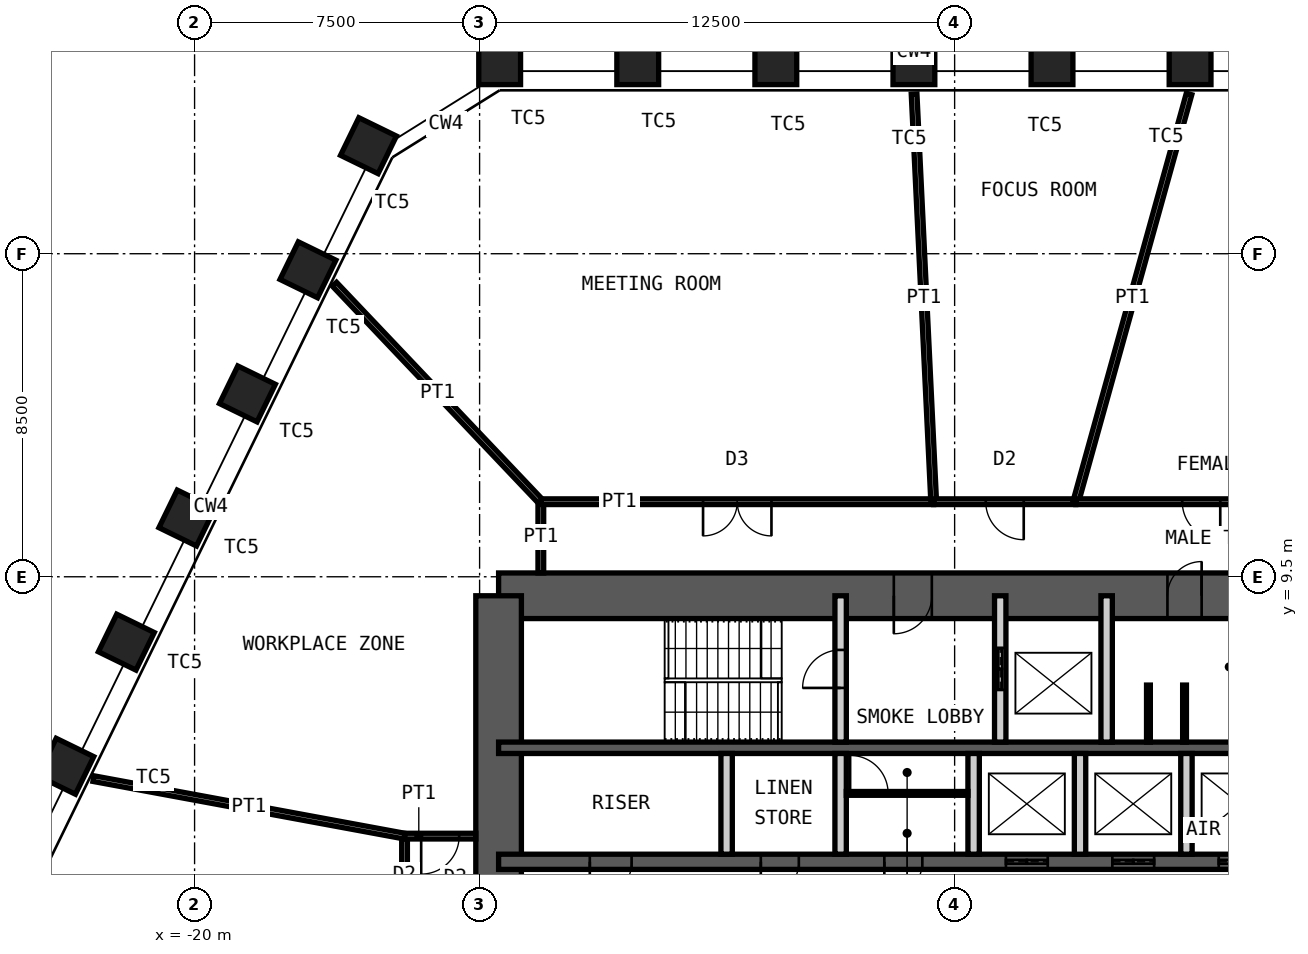
"""IFC4 building model, lengths in metres.
Left out: names, types, materials, properties, quantities, classifications, styles, units other than length and angle.
Written with IfcOpenShell. Run it as: python <this file> out.ifc"""

import sys

from ifc_helpers import new_model, si_unit, direction, frame, frame_2d, origin, origin_2d, place, context, subcontext, project, spatial, rectangle, hollow_rectangle, extrude, element, fill, save


model = new_model("IFC4")
c1 = context("Model", 3, precision=1e-05, world=origin(), true_north=direction((0.0, 1.0)))
c2 = subcontext(c1, "Body", "Model", "MODEL_VIEW")
j1 = project(units=[si_unit("LENGTHUNIT", "METRE"), si_unit("PLANEANGLEUNIT", "RADIAN")], contexts=[c1])
p1 = place(None, origin())
s1 = spatial("IfcSite", under=j1, at=p1, CompositionType="ELEMENT")
p2 = place(p1, origin())
s2 = spatial("IfcBuilding", under=s1, at=p2, CompositionType="ELEMENT")
p3 = place(p2, frame((0.0, 0.0, 209.8)))
s3 = spatial("IfcBuildingStorey", under=s2, at=p3, CompositionType="ELEMENT", Elevation=209.8)
for number, where, z_axis, x_axis in (
    (1, (-11.972, 23.0, 0.0), (0.0, 0.0, 1.0), (-1.0, 0.0, 0.0)),
    (2, (-8.338, 23.0, 0.0), (0.0, 0.0, 1.0), (-1.0, 0.0, 0.0)),
    (3, (-4.705, 23.0, 0.0), (0.0, 0.0, 1.0), (-1.0, 0.0, 0.0)),
    (4, (-1.071, 23.0, 0.0), (0.0, 0.0, 1.0), (-1.0, 0.0, 0.0)),
    (5, (2.562, 23.0, 0.0), (0.0, 0.0, 1.0), (-1.0, 0.0, 0.0)),
    (6, (6.196, 23.0, 0.0), (0.0, 0.0, 1.0), (-1.0, 0.0, 0.0)),
    (7, (-23.388, 4.514, 0.0), (0.0, 0.0, 1.0), (-0.438, -0.899, 0.0)),
    (8, (-21.795, 7.78, 0.0), (0.0, 0.0, 1.0), (-0.438, -0.899, 0.0)),
    (9, (-20.203, 11.045, 0.0), (0.0, 0.0, 1.0), (-0.438, -0.899, 0.0)),
    (10, (-18.61, 14.311, 0.0), (0.0, 0.0, 1.0), (-0.438, -0.899, 0.0)),
    (11, (-17.017, 17.577, 0.0), (0.0, 0.0, 1.0), (-0.438, -0.899, 0.0)),
    (12, (-15.424, 20.843, 0.0), (0.0, 0.0, 1.0), (-0.438, -0.899, 0.0)),
):
    element("IfcColumn", number, at=place(p3, frame(where, z_axis=z_axis, x_axis=x_axis)), inside=s3, PredefinedType="COLUMN", context=c2, shape_type="SweptSolid", body=[
        extrude(hollow_rectangle(XDim=1.1, YDim=1.1, WallThickness=0.07, at=origin_2d()), origin(), (0.0, 0.0, 1.0), 4.2),
    ])
p4 = place(p3, frame((-12.0, 9.0, 0.0), z_axis=(0.0, 0.0, 1.0), x_axis=(1.0, 0.0, 0.0)))
e13 = element("IfcWall", 13, at=p4, inside=s3, PredefinedType="SHEAR", context=c2, shape_type="SweptSolid", body=[
    extrude(rectangle(XDim=24.0, YDim=1.2, at=frame_2d((12.0, 0.0))), origin(), (0.0, 0.0, 1.0), 4.2),
])
p5 = place(p4, frame((10.4, 0.0, 0.0)))
e14 = element("IfcOpeningElement", 14, at=p5, cuts=e13, PredefinedType="OPENING", context=c2, shape_type="SweptSolid", body=[
    extrude(rectangle(XDim=1.0, YDim=2.1, at=frame_2d((0.5, 1.05))), frame((0.0, 0.61, 0.0), z_axis=(0.0, -1.0, 0.0), x_axis=(1.0, 0.0, 0.0)), (0.0, 0.0, 1.0), 1.22),
])
p6 = place(p4, frame((17.6, 0.0, 0.0)))
e15 = element("IfcOpeningElement", 15, at=p6, cuts=e13, PredefinedType="OPENING", context=c2, shape_type="SweptSolid", body=[
    extrude(rectangle(XDim=0.9, YDim=2.1, at=frame_2d((0.45, 1.05))), frame((0.0, 0.61, 0.0), z_axis=(0.0, -1.0, 0.0), x_axis=(1.0, 0.0, 0.0)), (0.0, 0.0, 1.0), 1.22),
])
p7 = place(p4, frame((21.9, 0.0, 0.0)))
e16 = element("IfcOpeningElement", 16, at=p7, cuts=e13, PredefinedType="OPENING", context=c2, shape_type="SweptSolid", body=[
    extrude(rectangle(XDim=0.9, YDim=2.1, at=frame_2d((0.45, 1.05))), frame((0.0, 0.61, 0.0), z_axis=(0.0, -1.0, 0.0), x_axis=(1.0, 0.0, 0.0)), (0.0, 0.0, 1.0), 1.22),
])
p8 = place(p3, frame((-12.0, -9.0, 0.0), z_axis=(0.0, 0.0, 1.0), x_axis=(0.0, 1.0, 0.0)))
e17 = element("IfcWall", 17, at=p8, inside=s3, PredefinedType="SHEAR", context=c2, shape_type="SweptSolid", body=[
    extrude(rectangle(XDim=18.0, YDim=1.2, at=frame_2d((9.0, 0.0))), origin(), (0.0, 0.0, 1.0), 4.2),
])
p9 = place(p8, frame((8.1, 0.0, 0.0)))
e18 = element("IfcOpeningElement", 18, at=p9, cuts=e17, PredefinedType="OPENING", context=c2, shape_type="SweptSolid", body=[
    extrude(rectangle(XDim=1.8, YDim=2.1, at=frame_2d((0.9, 1.05))), frame((0.0, 0.61, 0.0), z_axis=(0.0, -1.0, 0.0), x_axis=(1.0, 0.0, 0.0)), (0.0, 0.0, 1.0), 1.22),
])
p10 = place(p3, frame((-12.0, 5.0, 0.0), z_axis=(0.0, 0.0, 1.0), x_axis=(1.0, 0.0, 0.0)))
e19 = element("IfcWall", 19, at=p10, inside=s3, PredefinedType="SHEAR", context=c2, shape_type="SweptSolid", body=[
    extrude(rectangle(XDim=24.0, YDim=0.3, at=frame_2d((12.0, 0.0))), origin(), (0.0, 0.0, 1.0), 4.2),
])
p11 = place(p3, frame((-12.0, 2.0, 0.0), z_axis=(0.0, 0.0, 1.0), x_axis=(1.0, 0.0, 0.0)))
e20 = element("IfcWall", 20, at=p11, inside=s3, PredefinedType="SHEAR", context=c2, shape_type="SweptSolid", body=[
    extrude(rectangle(XDim=24.0, YDim=0.4, at=frame_2d((12.0, 0.0))), origin(), (0.0, 0.0, 1.0), 4.2),
])
p12 = place(p11, frame((2.4, 0.0, 0.0)))
e21 = element("IfcOpeningElement", 21, at=p12, cuts=e20, PredefinedType="OPENING", context=c2, shape_type="SweptSolid", body=[
    extrude(rectangle(XDim=1.1, YDim=2.1, at=frame_2d((0.55, 1.05))), frame((0.0, 0.21, 0.0), z_axis=(0.0, -1.0, 0.0), x_axis=(1.0, 0.0, 0.0)), (0.0, 0.0, 1.0), 0.42),
])
p13 = place(p11, frame((22.0, 0.0, 0.0)))
e22 = element("IfcOpeningElement", 22, at=p13, cuts=e20, PredefinedType="OPENING", context=c2, shape_type="SweptSolid", body=[
    extrude(rectangle(XDim=1.1, YDim=2.1, at=frame_2d((0.55, 1.05))), frame((0.0, 0.21, 0.0), z_axis=(0.0, -1.0, 0.0), x_axis=(1.0, 0.0, 0.0)), (0.0, 0.0, 1.0), 0.42),
])
p14 = place(p11, frame((10.15, 0.0, 0.0)))
e23 = element("IfcOpeningElement", 23, at=p14, cuts=e20, PredefinedType="OPENING", context=c2, shape_type="SweptSolid", body=[
    extrude(rectangle(XDim=1.0, YDim=2.1, at=frame_2d((0.5, 1.05))), frame((0.0, 0.21, 0.0), z_axis=(0.0, -1.0, 0.0), x_axis=(1.0, 0.0, 0.0)), (0.0, 0.0, 1.0), 0.42),
])
p15 = place(p11, frame((6.9, 0.0, 0.0)))
e24 = element("IfcOpeningElement", 24, at=p15, cuts=e20, PredefinedType="OPENING", context=c2, shape_type="SweptSolid", body=[
    extrude(rectangle(XDim=1.0, YDim=2.1, at=frame_2d((0.5, 1.05))), frame((0.0, 0.21, 0.0), z_axis=(0.0, -1.0, 0.0), x_axis=(1.0, 0.0, 0.0)), (0.0, 0.0, 1.0), 0.42),
])
p16 = place(p11, frame((13.35, 0.0, 0.0)))
e25 = element("IfcOpeningElement", 25, at=p16, cuts=e20, PredefinedType="OPENING", context=c2, shape_type="SweptSolid", body=[
    extrude(rectangle(XDim=1.1, YDim=2.4, at=frame_2d((0.55, 1.2))), frame((0.0, 0.21, 0.0), z_axis=(0.0, -1.0, 0.0), x_axis=(1.0, 0.0, 0.0)), (0.0, 0.0, 1.0), 0.42),
])
p17 = place(p11, frame((16.15, 0.0, 0.0)))
e26 = element("IfcOpeningElement", 26, at=p17, cuts=e20, PredefinedType="OPENING", context=c2, shape_type="SweptSolid", body=[
    extrude(rectangle(XDim=1.1, YDim=2.4, at=frame_2d((0.55, 1.2))), frame((0.0, 0.21, 0.0), z_axis=(0.0, -1.0, 0.0), x_axis=(1.0, 0.0, 0.0)), (0.0, 0.0, 1.0), 0.42),
])
p18 = place(p11, frame((18.95, 0.0, 0.0)))
e27 = element("IfcOpeningElement", 27, at=p18, cuts=e20, PredefinedType="OPENING", context=c2, shape_type="SweptSolid", body=[
    extrude(rectangle(XDim=1.1, YDim=2.4, at=frame_2d((0.55, 1.2))), frame((0.0, 0.21, 0.0), z_axis=(0.0, -1.0, 0.0), x_axis=(1.0, 0.0, 0.0)), (0.0, 0.0, 1.0), 0.42),
])
p19 = place(p3, frame((-3.0, 5.15, 0.0), z_axis=(0.0, 0.0, 1.0), x_axis=(0.0, 1.0, 0.0)))
e28 = element("IfcWall", 28, at=p19, inside=s3, PredefinedType="PARTITIONING", context=c2, shape_type="SweptSolid", body=[
    extrude(rectangle(XDim=3.85, YDim=0.3, at=frame_2d((1.925, 0.0))), origin(), (0.0, 0.0, 1.0), 3.98),
])
p20 = place(p19, frame((1.425, 0.0, 0.0)))
e29 = element("IfcOpeningElement", 29, at=p20, cuts=e28, PredefinedType="OPENING", context=c2, shape_type="SweptSolid", body=[
    extrude(rectangle(XDim=1.0, YDim=2.1, at=frame_2d((0.5, 1.05))), frame((0.0, 0.16, 0.0), z_axis=(0.0, -1.0, 0.0), x_axis=(1.0, 0.0, 0.0)), (0.0, 0.0, 1.0), 0.32),
])
p21 = place(p3, frame((1.2, 5.15, 0.0), z_axis=(0.0, 0.0, 1.0), x_axis=(0.0, 1.0, 0.0)))
e30 = element("IfcWall", 30, at=p21, inside=s3, PredefinedType="PARTITIONING", context=c2, shape_type="SweptSolid", body=[
    extrude(rectangle(XDim=3.85, YDim=0.3, at=frame_2d((1.925, 0.0))), origin(), (0.0, 0.0, 1.0), 3.98),
])
p22 = place(p21, frame((1.375, 0.0, 0.0)))
e31 = element("IfcOpeningElement", 31, at=p22, cuts=e30, PredefinedType="OPENING", context=c2, shape_type="SweptSolid", body=[
    extrude(rectangle(XDim=1.1, YDim=2.4, at=frame_2d((0.55, 1.2))), frame((0.0, 0.16, 0.0), z_axis=(0.0, -1.0, 0.0), x_axis=(1.0, 0.0, 0.0)), (0.0, 0.0, 1.0), 0.32),
])
p23 = place(p3, frame((4.0, 5.15, 0.0), z_axis=(0.0, 0.0, 1.0), x_axis=(0.0, 1.0, 0.0)))
e32 = element("IfcWall", 32, at=p23, inside=s3, PredefinedType="PARTITIONING", context=c2, shape_type="SweptSolid", body=[
    extrude(rectangle(XDim=3.85, YDim=0.3, at=frame_2d((1.925, 0.0))), origin(), (0.0, 0.0, 1.0), 3.98),
])
for number, where, z_axis, x_axis in (
    (33, (-6.0, 2.2, 0.0), (0.0, 0.0, 1.0), (0.0, 1.0, 0.0)),
    (34, (-3.0, 2.2, 0.0), (0.0, 0.0, 1.0), (0.0, 1.0, 0.0)),
    (35, (0.5, 2.2, 0.0), (0.0, 0.0, 1.0), (0.0, 1.0, 0.0)),
    (36, (3.3, 2.2, 0.0), (0.0, 0.0, 1.0), (0.0, 1.0, 0.0)),
    (37, (6.1, 2.2, 0.0), (0.0, 0.0, 1.0), (0.0, 1.0, 0.0)),
):
    element("IfcWall", number, at=place(p3, frame(where, z_axis=z_axis, x_axis=x_axis)), inside=s3, PredefinedType="PARTITIONING", context=c2, shape_type="SweptSolid", body=[
        extrude(rectangle(XDim=2.65, YDim=0.3, at=frame_2d((1.325, 0.0))), origin(), (0.0, 0.0, 1.0), 3.98),
    ])
p24 = place(p3, frame((-2.85, 3.8, 0.0), z_axis=(0.0, 0.0, 1.0), x_axis=(1.0, 0.0, 0.0)))
e38 = element("IfcWall", 38, at=p24, inside=s3, PredefinedType="PARTITIONING", context=c2, shape_type="SweptSolid", body=[
    extrude(rectangle(XDim=3.2, YDim=0.1, at=frame_2d((1.6, 0.0))), origin(), (0.0, 0.0, 1.0), 3.98),
])
p25 = place(p24, frame((0.1, 0.0, 0.0)))
e39 = element("IfcOpeningElement", 39, at=p25, cuts=e38, PredefinedType="OPENING", context=c2, shape_type="SweptSolid", body=[
    extrude(rectangle(XDim=1.0, YDim=2.4, at=frame_2d((0.5, 1.2))), frame((0.0, 0.06, 0.0), z_axis=(0.0, -1.0, 0.0), x_axis=(1.0, 0.0, 0.0)), (0.0, 0.0, 1.0), 0.12),
])
for number, where, z_axis, x_axis in (
    (40, (5.1, 5.15, 0.0), (0.0, 0.0, 1.0), (0.0, 1.0, 0.0)),
    (41, (6.05, 5.15, 0.0), (0.0, 0.0, 1.0), (0.0, 1.0, 0.0)),
):
    element("IfcWall", number, at=place(p3, frame(where, z_axis=z_axis, x_axis=x_axis)), inside=s3, PredefinedType="PARTITIONING", context=c2, shape_type="SweptSolid", body=[
        extrude(rectangle(XDim=1.5, YDim=0.1, at=frame_2d((0.75, 0.0))), origin(), (0.0, 0.0, 1.0), 2.1),
    ])
p26 = place(p3, frame((-14.475, -1.576, 0.0), z_axis=(0.0, 0.0, 1.0), x_axis=(0.0, 1.0, 0.0)))
e42 = element("IfcWall", 42, at=p26, inside=s3, PredefinedType="PARTITIONING", context=c2, shape_type="SweptSolid", body=[
    extrude(rectangle(XDim=4.252, YDim=0.15, at=frame_2d((2.126, 0.0))), origin(), (0.0, 0.0, 1.0), 4.03),
])
p27 = place(p26, frame((1.626, 0.0, 0.0)))
e43 = element("IfcOpeningElement", 43, at=p27, cuts=e42, PredefinedType="OPENING", context=c2, shape_type="SweptSolid", body=[
    extrude(rectangle(XDim=1.0, YDim=2.4, at=frame_2d((0.5, 1.2))), frame((0.0, 0.085, 0.0), z_axis=(0.0, -1.0, 0.0), x_axis=(1.0, 0.0, 0.0)), (0.0, 0.0, 1.0), 0.17),
])
p28 = place(p3, frame((-22.661, 4.189, 0.0), z_axis=(0.0, 0.0, 1.0), x_axis=(0.983345347199, -0.181746879316, 0.0)))
e44 = element("IfcWall", 44, at=p28, inside=s3, PredefinedType="PARTITIONING", context=c2, shape_type="SweptSolid", body=[
    extrude(rectangle(XDim=8.324, YDim=0.15, at=frame_2d((4.162, 0.0))), origin(), (0.0, 0.0, 1.0), 3.43),
])
p29 = place(p3, frame((-14.475, 2.676, 0.0), z_axis=(0.0, 0.0, 1.0), x_axis=(1.0, 0.0, 0.0)))
e45 = element("IfcWall", 45, at=p29, inside=s3, PredefinedType="PARTITIONING", context=c2, shape_type="SweptSolid", body=[
    extrude(rectangle(XDim=1.875, YDim=0.15, at=frame_2d((0.938, 0.0))), origin(), (0.0, 0.0, 1.0), 3.43),
])
p30 = place(p29, frame((0.438, 0.0, 0.0)))
e46 = element("IfcOpeningElement", 46, at=p30, cuts=e45, PredefinedType="OPENING", context=c2, shape_type="SweptSolid", body=[
    extrude(rectangle(XDim=1.0, YDim=2.4, at=frame_2d((0.5, 1.2))), frame((0.0, 0.085, 0.0), z_axis=(0.0, -1.0, 0.0), x_axis=(1.0, 0.0, 0.0)), (0.0, 0.0, 1.0), 0.17),
])
p31 = place(p3, frame((-10.889, 9.6, 0.0), z_axis=(0.0, 0.0, 1.0), x_axis=(0.0, 1.0, 0.0)))
e47 = element("IfcWall", 47, at=p31, inside=s3, PredefinedType="PARTITIONING", context=c2, shape_type="SweptSolid", body=[
    extrude(rectangle(XDim=1.875, YDim=0.15, at=frame_2d((0.938, 0.0))), origin(), (0.0, 0.0, 1.0), 4.03),
])
p32 = place(p3, frame((-16.319, 17.198, 0.0), z_axis=(0.0, 0.0, 1.0), x_axis=(0.688326413955, -0.725401094466, 0.0)))
e48 = element("IfcWall", 48, at=p32, inside=s3, PredefinedType="PARTITIONING", context=c2, shape_type="SweptSolid", body=[
    extrude(rectangle(XDim=7.889, YDim=0.15, at=frame_2d((3.944, 0.0))), origin(), (0.0, 0.0, 1.0), 4.03),
])
p33 = place(p3, frame((-10.889, 11.475, 0.0), z_axis=(0.0, 0.0, 1.0), x_axis=(1.0, 0.0, 0.0)))
e49 = element("IfcWall", 49, at=p33, inside=s3, PredefinedType="PARTITIONING", context=c2, shape_type="SweptSolid", body=[
    extrude(rectangle(XDim=10.337, YDim=0.15, at=frame_2d((5.169, 0.0))), origin(), (0.0, 0.0, 1.0), 4.03),
])
p34 = place(p33, frame((4.269, 0.0, 0.0)))
e50 = element("IfcOpeningElement", 50, at=p34, cuts=e49, PredefinedType="OPENING", context=c2, shape_type="SweptSolid", body=[
    extrude(rectangle(XDim=1.8, YDim=2.4, at=frame_2d((0.9, 1.2))), frame((0.0, 0.085, 0.0), z_axis=(0.0, -1.0, 0.0), x_axis=(1.0, 0.0, 0.0)), (0.0, 0.0, 1.0), 0.17),
])
p35 = place(p3, frame((-1.067, 22.2, 0.0), z_axis=(0.0, 0.0, 1.0), x_axis=(0.047998335863, -0.998847415652, 0.0)))
e51 = element("IfcWall", 51, at=p35, inside=s3, PredefinedType="PARTITIONING", context=c2, shape_type="SweptSolid", body=[
    extrude(rectangle(XDim=10.738, YDim=0.15, at=frame_2d((5.369, 0.0))), origin(), (0.0, 0.0, 1.0), 3.43),
])
p36 = place(p3, frame((-0.551, 11.475, 0.0), z_axis=(0.0, 0.0, 1.0), x_axis=(1.0, 0.0, 0.0)))
e52 = element("IfcWall", 52, at=p36, inside=s3, PredefinedType="PARTITIONING", context=c2, shape_type="SweptSolid", body=[
    extrude(rectangle(XDim=3.74, YDim=0.15, at=frame_2d((1.87, 0.0))), origin(), (0.0, 0.0, 1.0), 4.03),
])
p37 = place(p36, frame((1.37, 0.0, 0.0)))
e53 = element("IfcOpeningElement", 53, at=p37, cuts=e52, PredefinedType="OPENING", context=c2, shape_type="SweptSolid", body=[
    extrude(rectangle(XDim=1.0, YDim=2.4, at=frame_2d((0.5, 1.2))), frame((0.0, 0.085, 0.0), z_axis=(0.0, -1.0, 0.0), x_axis=(1.0, 0.0, 0.0)), (0.0, 0.0, 1.0), 0.17),
])
p38 = place(p3, frame((6.169, 22.204, 0.0), z_axis=(0.0, 0.0, 1.0), x_axis=(-0.26769135876, -0.963504715321, 0.0)))
e54 = element("IfcWall", 54, at=p38, inside=s3, PredefinedType="PARTITIONING", context=c2, shape_type="SweptSolid", body=[
    extrude(rectangle(XDim=11.135, YDim=0.15, at=frame_2d((5.567, 0.0))), origin(), (0.0, 0.0, 1.0), 3.43),
])
p39 = place(p3, frame((3.188, 11.475, 0.0), z_axis=(0.0, 0.0, 1.0), x_axis=(1.0, 0.0, 0.0)))
e55 = element("IfcWall", 55, at=p39, inside=s3, PredefinedType="PARTITIONING", context=c2, shape_type="SweptSolid", body=[
    extrude(rectangle(XDim=6.603, YDim=0.15, at=frame_2d((3.301, 0.0))), origin(), (0.0, 0.0, 1.0), 4.03),
])
p40 = place(p39, frame((2.802, 0.0, 0.0)))
e56 = element("IfcOpeningElement", 56, at=p40, cuts=e55, PredefinedType="OPENING", context=c2, shape_type="SweptSolid", body=[
    extrude(rectangle(XDim=1.0, YDim=2.4, at=frame_2d((0.5, 1.2))), frame((0.0, 0.085, 0.0), z_axis=(0.0, -1.0, 0.0), x_axis=(1.0, 0.0, 0.0)), (0.0, 0.0, 1.0), 0.17),
])
p41 = place(p5, origin())
e57 = element("IfcDoor", 57, at=p41, inside=s3, OperationType="SINGLE_SWING_LEFT", PredefinedType="DOOR", context=c2, shape_type="SweptSolid", body=[
    extrude(rectangle(XDim=1.0, YDim=2.1, at=frame_2d((0.5, 1.05))), frame((0.0, 0.025, 0.0), z_axis=(0.0, -1.0, 0.0), x_axis=(1.0, 0.0, 0.0)), (0.0, 0.0, 1.0), 0.05),
])
fill(e14, e57)
p42 = place(p6, origin())
e58 = element("IfcDoor", 58, at=p42, inside=s3, OperationType="SINGLE_SWING_LEFT", PredefinedType="DOOR", context=c2, shape_type="SweptSolid", body=[
    extrude(rectangle(XDim=0.9, YDim=2.1, at=frame_2d((0.45, 1.05))), frame((0.0, 0.025, 0.0), z_axis=(0.0, -1.0, 0.0), x_axis=(1.0, 0.0, 0.0)), (0.0, 0.0, 1.0), 0.05),
])
fill(e15, e58)
p43 = place(p20, origin())
e59 = element("IfcDoor", 59, at=p43, inside=s3, OperationType="SINGLE_SWING_RIGHT", PredefinedType="DOOR", context=c2, shape_type="SweptSolid", body=[
    extrude(rectangle(XDim=1.0, YDim=2.1, at=frame_2d((0.5, 1.05))), frame((0.0, 0.025, 0.0), z_axis=(0.0, -1.0, 0.0), x_axis=(1.0, 0.0, 0.0)), (0.0, 0.0, 1.0), 0.05),
])
fill(e29, e59)
p44 = place(p12, origin())
e60 = element("IfcDoor", 60, at=p44, inside=s3, OperationType="SINGLE_SWING_LEFT", PredefinedType="DOOR", context=c2, shape_type="SweptSolid", body=[
    extrude(rectangle(XDim=1.1, YDim=2.1, at=frame_2d((0.55, 1.05))), frame((0.0, 0.025, 0.0), z_axis=(0.0, -1.0, 0.0), x_axis=(1.0, 0.0, 0.0)), (0.0, 0.0, 1.0), 0.05),
])
fill(e21, e60)
p45 = place(p14, origin())
e61 = element("IfcDoor", 61, at=p45, inside=s3, OperationType="SINGLE_SWING_LEFT", PredefinedType="DOOR", context=c2, shape_type="SweptSolid", body=[
    extrude(rectangle(XDim=1.0, YDim=2.1, at=frame_2d((0.5, 1.05))), frame((0.0, 0.025, 0.0), z_axis=(0.0, -1.0, 0.0), x_axis=(1.0, 0.0, 0.0)), (0.0, 0.0, 1.0), 0.05),
])
fill(e23, e61)
p46 = place(p22, origin())
e62 = element("IfcDoor", 62, at=p46, inside=s3, OperationType="DOUBLE_DOOR_SLIDING", PredefinedType="DOOR", context=c2, shape_type="SweptSolid", body=[
    extrude(rectangle(XDim=1.1, YDim=2.4, at=frame_2d((0.55, 1.2))), frame((0.0, 0.025, 0.0), z_axis=(0.0, -1.0, 0.0), x_axis=(1.0, 0.0, 0.0)), (0.0, 0.0, 1.0), 0.05),
])
fill(e31, e62)
p47 = place(p15, origin())
e63 = element("IfcDoor", 63, at=p47, inside=s3, OperationType="SINGLE_SWING_LEFT", PredefinedType="DOOR", context=c2, shape_type="SweptSolid", body=[
    extrude(rectangle(XDim=1.0, YDim=2.1, at=frame_2d((0.5, 1.05))), frame((0.0, 0.025, 0.0), z_axis=(0.0, -1.0, 0.0), x_axis=(1.0, 0.0, 0.0)), (0.0, 0.0, 1.0), 0.05),
])
fill(e24, e63)
p48 = place(p16, origin())
e64 = element("IfcDoor", 64, at=p48, inside=s3, OperationType="DOUBLE_DOOR_SLIDING", PredefinedType="DOOR", context=c2, shape_type="SweptSolid", body=[
    extrude(rectangle(XDim=1.1, YDim=2.4, at=frame_2d((0.55, 1.2))), frame((0.0, 0.025, 0.0), z_axis=(0.0, -1.0, 0.0), x_axis=(1.0, 0.0, 0.0)), (0.0, 0.0, 1.0), 0.05),
])
fill(e25, e64)
p49 = place(p17, origin())
e65 = element("IfcDoor", 65, at=p49, inside=s3, OperationType="DOUBLE_DOOR_SLIDING", PredefinedType="DOOR", context=c2, shape_type="SweptSolid", body=[
    extrude(rectangle(XDim=1.1, YDim=2.4, at=frame_2d((0.55, 1.2))), frame((0.0, 0.025, 0.0), z_axis=(0.0, -1.0, 0.0), x_axis=(1.0, 0.0, 0.0)), (0.0, 0.0, 1.0), 0.05),
])
fill(e26, e65)
p50 = place(p18, origin())
e66 = element("IfcDoor", 66, at=p50, inside=s3, OperationType="DOUBLE_DOOR_SLIDING", PredefinedType="DOOR", context=c2, shape_type="SweptSolid", body=[
    extrude(rectangle(XDim=1.1, YDim=2.4, at=frame_2d((0.55, 1.2))), frame((0.0, 0.025, 0.0), z_axis=(0.0, -1.0, 0.0), x_axis=(1.0, 0.0, 0.0)), (0.0, 0.0, 1.0), 0.05),
])
fill(e27, e66)
p51 = place(p25, origin())
e67 = element("IfcDoor", 67, at=p51, inside=s3, OperationType="SINGLE_SWING_RIGHT", PredefinedType="DOOR", context=c2, shape_type="SweptSolid", body=[
    extrude(rectangle(XDim=1.0, YDim=2.4, at=frame_2d((0.5, 1.2))), frame((0.0, 0.025, 0.0), z_axis=(0.0, -1.0, 0.0), x_axis=(1.0, 0.0, 0.0)), (0.0, 0.0, 1.0), 0.05),
])
fill(e39, e67)
p52 = place(p30, origin())
e68 = element("IfcDoor", 68, at=p52, inside=s3, OperationType="SINGLE_SWING_LEFT", PredefinedType="DOOR", context=c2, shape_type="SweptSolid", body=[
    extrude(rectangle(XDim=1.0, YDim=2.4, at=frame_2d((0.5, 1.2))), frame((0.0, 0.025, 0.0), z_axis=(0.0, -1.0, 0.0), x_axis=(1.0, 0.0, 0.0)), (0.0, 0.0, 1.0), 0.05),
])
fill(e46, e68)
p53 = place(p34, origin())
e69 = element("IfcDoor", 69, at=p53, inside=s3, OperationType="DOUBLE_DOOR_DOUBLE_SWING", PredefinedType="DOOR", context=c2, shape_type="SweptSolid", body=[
    extrude(rectangle(XDim=1.8, YDim=2.4, at=frame_2d((0.9, 1.2))), frame((0.0, 0.025, 0.0), z_axis=(0.0, -1.0, 0.0), x_axis=(1.0, 0.0, 0.0)), (0.0, 0.0, 1.0), 0.05),
])
fill(e50, e69)
p54 = place(p37, origin())
e70 = element("IfcDoor", 70, at=p54, inside=s3, OperationType="SINGLE_SWING_RIGHT", PredefinedType="DOOR", context=c2, shape_type="SweptSolid", body=[
    extrude(rectangle(XDim=1.0, YDim=2.4, at=frame_2d((0.5, 1.2))), frame((0.0, 0.025, 0.0), z_axis=(0.0, -1.0, 0.0), x_axis=(1.0, 0.0, 0.0)), (0.0, 0.0, 1.0), 0.05),
])
fill(e53, e70)
p55 = place(p40, origin())
e71 = element("IfcDoor", 71, at=p55, inside=s3, OperationType="SINGLE_SWING_RIGHT", PredefinedType="DOOR", context=c2, shape_type="SweptSolid", body=[
    extrude(rectangle(XDim=1.0, YDim=2.4, at=frame_2d((0.5, 1.2))), frame((0.0, 0.025, 0.0), z_axis=(0.0, -1.0, 0.0), x_axis=(1.0, 0.0, 0.0)), (0.0, 0.0, 1.0), 0.05),
])
fill(e56, e71)
save(model, sys.argv[1])
